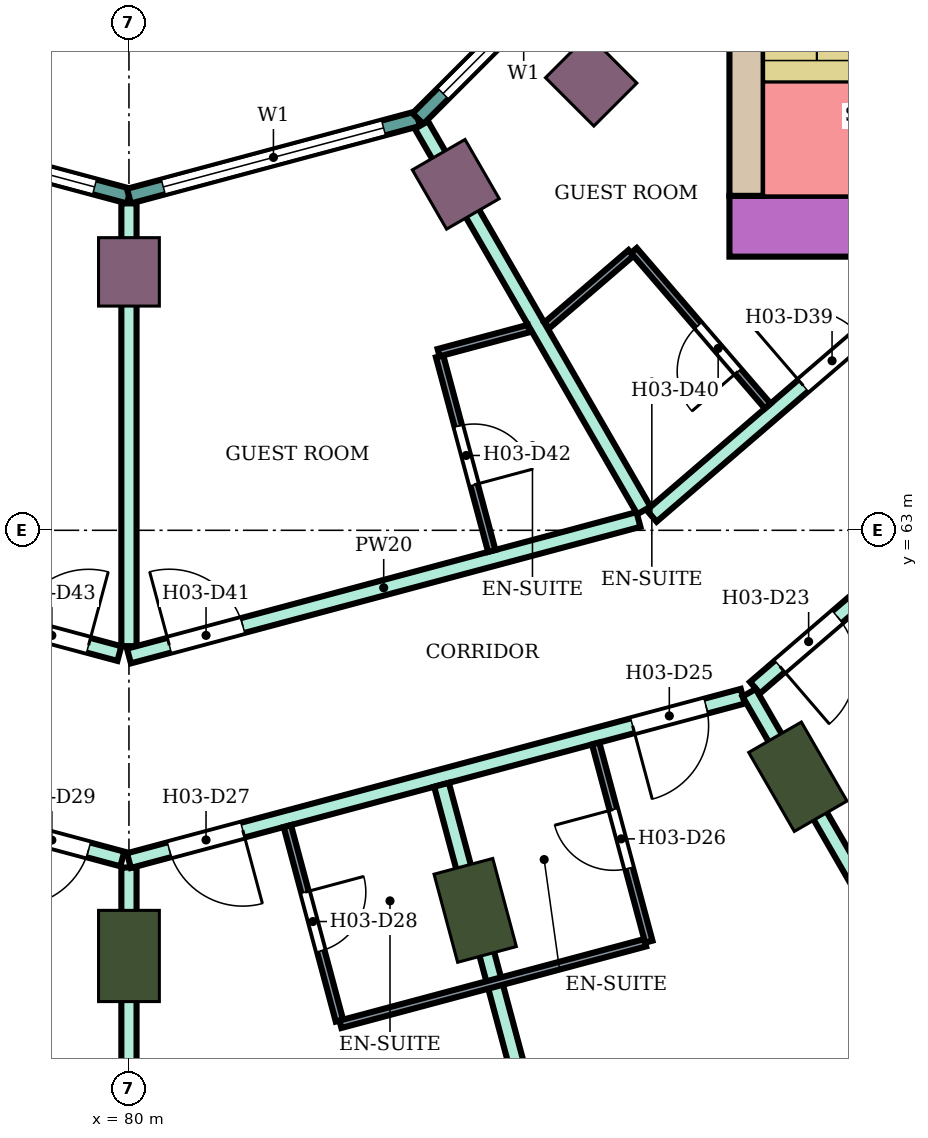
"""IFC4 building model, lengths in metres.
Left out: names, types, materials, properties, quantities, classifications, styles, units other than length and angle.
Written with IfcOpenShell. Run it as: python <this file> out.ifc"""

import sys

from ifc_helpers import new_model, si_unit, direction, frame, frame_2d, origin, origin_2d, place, context, subcontext, project, spatial, rectangle, extrude, element, fill, save


model = new_model("IFC4")
c1 = context("Model", 3, precision=1e-05, world=origin(), true_north=direction((0.0, 1.0)))
c2 = subcontext(c1, "Body", "Model", "MODEL_VIEW")
j1 = project(units=[si_unit("LENGTHUNIT", "METRE"), si_unit("PLANEANGLEUNIT", "RADIAN")], contexts=[c1])
p1 = place(None, origin())
s1 = spatial("IfcSite", under=j1, at=p1, CompositionType="ELEMENT")
p2 = place(p1, origin())
s2 = spatial("IfcBuilding", under=s1, at=p2, CompositionType="ELEMENT")
p3 = place(p2, frame((0.0, 0.0, 59.2)))
s3 = spatial("IfcBuildingStorey", under=s2, at=p3, CompositionType="ELEMENT", Elevation=59.2)
for number, where, z_axis, x_axis in (
    (1, (80.0, 57.4, 0.0), (0.0, 0.0, 1.0), (0.0, -1.0, 0.0)),
    (2, (84.555, 58.0, 0.0), (0.0, 0.0, 1.0), (0.259, -0.966, 0.0)),
    (3, (88.8, 59.758, 0.0), (0.0, 0.0, 1.0), (0.5, -0.866, 0.0)),
):
    element("IfcColumn", number, at=place(p3, frame(where, z_axis=z_axis, x_axis=x_axis)), inside=s3, PredefinedType="COLUMN", context=c2, shape_type="SweptSolid", body=[
        extrude(rectangle(XDim=1.2, YDim=0.8, at=origin_2d()), origin(), (0.0, 0.0, 1.0), 3.8),
    ])
for number, where, z_axis, x_axis in (
    (4, (80.0, 66.4, 0.0), (0.0, 0.0, 1.0), (0.0, -1.0, 0.0)),
    (5, (84.3, 67.552, 0.0), (0.0, 0.0, 1.0), (0.5, -0.866, 0.0)),
    (6, (86.081, 68.919, 0.0), (0.0, 0.0, 1.0), (0.707, -0.707, 0.0)),
):
    element("IfcColumn", number, at=place(p3, frame(where, z_axis=z_axis, x_axis=x_axis)), inside=s3, PredefinedType="COLUMN", context=c2, shape_type="SweptSolid", body=[
        extrude(rectangle(XDim=0.9, YDim=0.8, at=origin_2d()), origin(), (0.0, 0.0, 1.0), 3.8),
    ])
p4 = place(p3, frame((87.9, 67.0, 0.0), z_axis=(0.0, 0.0, 1.0), x_axis=(1.0, 0.0, 0.0)))
e7 = element("IfcWall", 7, at=p4, inside=s3, PredefinedType="SHEAR", context=c2, shape_type="SweptSolid", body=[
    extrude(rectangle(XDim=14.7, YDim=0.8, at=frame_2d((7.35, 0.0))), origin(), (0.0, 0.0, 1.0), 3.48),
])
p5 = place(p4, frame((4.2, 0.0, 0.0)))
e8 = element("IfcOpeningElement", 8, at=p5, cuts=e7, PredefinedType="OPENING", context=c2, shape_type="SweptSolid", body=[
    extrude(rectangle(XDim=2.4, YDim=2.4, at=frame_2d((1.2, 1.2))), frame((0.0, 0.41, 0.0), z_axis=(0.0, -1.0, 0.0), x_axis=(1.0, 0.0, 0.0)), (0.0, 0.0, 1.0), 0.82),
])
p6 = place(p3, frame((88.125, 67.4, 0.0), z_axis=(0.0, 0.0, 1.0), x_axis=(0.0, 1.0, 0.0)))
e9 = element("IfcWall", 9, at=p6, inside=s3, PredefinedType="SHEAR", context=c2, shape_type="SweptSolid", body=[
    extrude(rectangle(XDim=7.6, YDim=0.45, at=frame_2d((3.8, 0.0))), origin(), (0.0, 0.0, 1.0), 3.48),
])
p7 = place(p3, frame((76.198, 68.415, 0.0), z_axis=(0.0, 0.0, 1.0), x_axis=(0.965933654434, -0.258789828301, 0.0)))
e10 = element("IfcWall", 10, at=p7, inside=s3, PredefinedType="NOTDEFINED", context=c2, shape_type="SweptSolid", body=[
    extrude(rectangle(XDim=3.936, YDim=0.2, at=frame_2d((1.968, 0.0))), origin(), (0.0, 0.0, 1.0), 3.8),
])
p8 = place(p7, frame((0.468, 0.0, 0.9)))
e11 = element("IfcOpeningElement", 11, at=p8, cuts=e10, PredefinedType="OPENING", context=c2, shape_type="SweptSolid", body=[
    extrude(rectangle(XDim=3.0, YDim=2.3, at=frame_2d((1.5, 1.15))), frame((0.0, 0.11, 0.0), z_axis=(0.0, -1.0, 0.0), x_axis=(1.0, 0.0, 0.0)), (0.0, 0.0, 1.0), 0.22),
])
p9 = place(p3, frame((80.0, 67.396, 0.0), z_axis=(0.0, 0.0, 1.0), x_axis=(0.965933654434, 0.258789828301, 0.0)))
e12 = element("IfcWall", 12, at=p9, inside=s3, PredefinedType="NOTDEFINED", context=c2, shape_type="SweptSolid", body=[
    extrude(rectangle(XDim=3.936, YDim=0.2, at=frame_2d((1.968, 0.0))), origin(), (0.0, 0.0, 1.0), 3.8),
])
p10 = place(p9, frame((0.468, 0.0, 0.9)))
e13 = element("IfcOpeningElement", 13, at=p10, cuts=e12, PredefinedType="OPENING", context=c2, shape_type="SweptSolid", body=[
    extrude(rectangle(XDim=3.0, YDim=2.3, at=frame_2d((1.5, 1.15))), frame((0.0, 0.11, 0.0), z_axis=(0.0, -1.0, 0.0), x_axis=(1.0, 0.0, 0.0)), (0.0, 0.0, 1.0), 0.22),
])
p11 = place(p3, frame((83.802, 68.415, 0.0), z_axis=(0.0, 0.0, 1.0), x_axis=(0.707106781187, 0.707106781187, 0.0)))
e14 = element("IfcWall", 14, at=p11, inside=s3, PredefinedType="NOTDEFINED", context=c2, shape_type="SweptSolid", body=[
    extrude(rectangle(XDim=3.936, YDim=0.2, at=frame_2d((1.968, 0.0))), origin(), (0.0, 0.0, 1.0), 3.8),
])
p12 = place(p11, frame((0.468, 0.0, 0.9)))
e15 = element("IfcOpeningElement", 15, at=p12, cuts=e14, PredefinedType="OPENING", context=c2, shape_type="SweptSolid", body=[
    extrude(rectangle(XDim=3.0, YDim=2.3, at=frame_2d((1.5, 1.15))), frame((0.0, 0.11, 0.0), z_axis=(0.0, -1.0, 0.0), x_axis=(1.0, 0.0, 0.0)), (0.0, 0.0, 1.0), 0.22),
])
p13 = place(p3, frame((71.877, 60.831, 0.0), z_axis=(0.0, 0.0, 1.0), x_axis=(0.965852509869, -0.259092510851, 0.0)))
e16 = element("IfcWall", 16, at=p13, inside=s3, PredefinedType="PARTITIONING", context=c2, shape_type="SweptSolid", body=[
    extrude(rectangle(XDim=8.32, YDim=0.2, at=frame_2d((4.16, 0.0))), origin(), (0.0, 0.0, 1.0), 3.35),
])
p14 = place(p13, frame((6.86, 0.0, 0.0)))
e17 = element("IfcOpeningElement", 17, at=p14, cuts=e16, PredefinedType="OPENING", context=c2, shape_type="SweptSolid", body=[
    extrude(rectangle(XDim=1.0, YDim=2.1, at=frame_2d((0.5, 1.05))), frame((0.0, 0.11, 0.0), z_axis=(0.0, -1.0, 0.0), x_axis=(1.0, 0.0, 0.0)), (0.0, 0.0, 1.0), 0.22),
])
p15 = place(p13, frame((1.6, 0.0, 0.0)))
e18 = element("IfcOpeningElement", 18, at=p15, cuts=e16, PredefinedType="OPENING", context=c2, shape_type="SweptSolid", body=[
    extrude(rectangle(XDim=1.0, YDim=2.1, at=frame_2d((0.5, 1.05))), frame((0.0, 0.11, 0.0), z_axis=(0.0, -1.0, 0.0), x_axis=(1.0, 0.0, 0.0)), (0.0, 0.0, 1.0), 0.22),
])
p16 = place(p3, frame((73.297, 63.143, 0.0), z_axis=(0.0, 0.0, 1.0), x_axis=(0.965859030528, -0.25906820173, 0.0)))
e19 = element("IfcWall", 19, at=p16, inside=s3, PredefinedType="PARTITIONING", context=c2, shape_type="SweptSolid", body=[
    extrude(rectangle(XDim=6.81, YDim=0.2, at=frame_2d((3.405, 0.0))), origin(), (0.0, 0.0, 1.0), 3.35),
])
p17 = place(p16, frame((5.39, 0.0, 0.0)))
e20 = element("IfcOpeningElement", 20, at=p17, cuts=e19, PredefinedType="OPENING", context=c2, shape_type="SweptSolid", body=[
    extrude(rectangle(XDim=1.0, YDim=2.1, at=frame_2d((0.5, 1.05))), frame((0.0, 0.11, 0.0), z_axis=(0.0, -1.0, 0.0), x_axis=(1.0, 0.0, 0.0)), (0.0, 0.0, 1.0), 0.22),
])
p18 = place(p3, frame((80.0, 51.8, 0.0), z_axis=(0.0, 0.0, 1.0), x_axis=(0.0, 1.0, 0.0)))
e21 = element("IfcWall", 21, at=p18, inside=s3, PredefinedType="PARTITIONING", context=c2, shape_type="SweptSolid", body=[
    extrude(rectangle(XDim=6.764, YDim=0.2, at=frame_2d((3.382, 0.0))), origin(), (0.0, 0.0, 1.0), 3.35),
])
p19 = place(p3, frame((80.0, 58.655, 0.0), z_axis=(0.0, 0.0, 1.0), x_axis=(0.965974635626, 0.258636817424, 0.0)))
e22 = element("IfcWall", 22, at=p19, inside=s3, PredefinedType="PARTITIONING", context=c2, shape_type="SweptSolid", body=[
    extrude(rectangle(XDim=8.36, YDim=0.2, at=frame_2d((4.18, 0.0))), origin(), (0.0, 0.0, 1.0), 3.35),
])
p20 = place(p19, frame((6.86, 0.0, 0.0)))
e23 = element("IfcOpeningElement", 23, at=p20, cuts=e22, PredefinedType="OPENING", context=c2, shape_type="SweptSolid", body=[
    extrude(rectangle(XDim=1.0, YDim=2.1, at=frame_2d((0.5, 1.05))), frame((0.0, 0.11, 0.0), z_axis=(0.0, -1.0, 0.0), x_axis=(1.0, 0.0, 0.0)), (0.0, 0.0, 1.0), 0.22),
])
p21 = place(p19, frame((0.55, 0.0, 0.0)))
e24 = element("IfcOpeningElement", 24, at=p21, cuts=e22, PredefinedType="OPENING", context=c2, shape_type="SweptSolid", body=[
    extrude(rectangle(XDim=1.0, YDim=2.1, at=frame_2d((0.5, 1.05))), frame((0.0, 0.11, 0.0), z_axis=(0.0, -1.0, 0.0), x_axis=(1.0, 0.0, 0.0)), (0.0, 0.0, 1.0), 0.22),
])
p22 = place(p3, frame((80.0, 61.476, 0.0), z_axis=(0.0, 0.0, 1.0), x_axis=(0.0, 1.0, 0.0)))
e25 = element("IfcWall", 25, at=p22, inside=s3, PredefinedType="PARTITIONING", context=c2, shape_type="SweptSolid", body=[
    extrude(rectangle(XDim=5.825, YDim=0.2, at=frame_2d((2.913, 0.0))), origin(), (0.0, 0.0, 1.0), 3.35),
])
p23 = place(p3, frame((80.0, 61.346, 0.0), z_axis=(0.0, 0.0, 1.0), x_axis=(0.965924181808, 0.258825182312, 0.0)))
e26 = element("IfcWall", 26, at=p23, inside=s3, PredefinedType="PARTITIONING", context=c2, shape_type="SweptSolid", body=[
    extrude(rectangle(XDim=6.94, YDim=0.2, at=frame_2d((3.47, 0.0))), origin(), (0.0, 0.0, 1.0), 3.35),
])
p24 = place(p23, frame((0.55, 0.0, 0.0)))
e27 = element("IfcOpeningElement", 27, at=p24, cuts=e26, PredefinedType="OPENING", context=c2, shape_type="SweptSolid", body=[
    extrude(rectangle(XDim=1.0, YDim=2.1, at=frame_2d((0.5, 1.05))), frame((0.0, 0.11, 0.0), z_axis=(0.0, -1.0, 0.0), x_axis=(1.0, 0.0, 0.0)), (0.0, 0.0, 1.0), 0.22),
])
p25 = place(p3, frame((83.848, 68.332, 0.0), z_axis=(0.0, 0.0, 1.0), x_axis=(0.499901724708, -0.866082135617, 0.0)))
e28 = element("IfcWall", 28, at=p25, inside=s3, PredefinedType="PARTITIONING", context=c2, shape_type="SweptSolid", body=[
    extrude(rectangle(XDim=5.855, YDim=0.2, at=frame_2d((2.928, 0.0))), origin(), (0.0, 0.0, 1.0), 3.35),
])
p26 = place(p3, frame((84.112, 59.652, 0.0), z_axis=(0.0, 0.0, 1.0), x_axis=(0.258843225553, -0.965919346832, 0.0)))
e29 = element("IfcWall", 29, at=p26, inside=s3, PredefinedType="PARTITIONING", context=c2, shape_type="SweptSolid", body=[
    extrude(rectangle(XDim=9.909, YDim=0.2, at=frame_2d((4.955, 0.0))), origin(), (0.0, 0.0, 1.0), 3.35),
])
p27 = place(p3, frame((86.877, 63.189, 0.0), z_axis=(0.0, 0.0, 1.0), x_axis=(0.758164888471, 0.652062881853, 0.0)))
e30 = element("IfcWall", 30, at=p27, inside=s3, PredefinedType="PARTITIONING", context=c2, shape_type="SweptSolid", body=[
    extrude(rectangle(XDim=5.23, YDim=0.2, at=frame_2d((2.615, 0.0))), origin(), (0.0, 0.0, 1.0), 3.35),
])
p28 = place(p27, frame((2.63, 0.0, 0.0)))
e31 = element("IfcOpeningElement", 31, at=p28, cuts=e30, PredefinedType="OPENING", context=c2, shape_type="SweptSolid", body=[
    extrude(rectangle(XDim=1.0, YDim=2.1, at=frame_2d((0.5, 1.05))), frame((0.0, 0.11, 0.0), z_axis=(0.0, -1.0, 0.0), x_axis=(1.0, 0.0, 0.0)), (0.0, 0.0, 1.0), 0.22),
])
p29 = place(p3, frame((88.236, 60.929, 0.0), z_axis=(0.0, 0.0, 1.0), x_axis=(0.758227485202, 0.651990092474, 0.0)))
e32 = element("IfcWall", 32, at=p29, inside=s3, PredefinedType="PARTITIONING", context=c2, shape_type="SweptSolid", body=[
    extrude(rectangle(XDim=6.336, YDim=0.2, at=frame_2d((3.168, 0.0))), origin(), (0.0, 0.0, 1.0), 3.35),
])
p30 = place(p29, frame((4.757, 0.0, 0.0)))
e33 = element("IfcOpeningElement", 33, at=p30, cuts=e32, PredefinedType="OPENING", context=c2, shape_type="SweptSolid", body=[
    extrude(rectangle(XDim=1.0, YDim=2.1, at=frame_2d((0.5, 1.05))), frame((0.0, 0.11, 0.0), z_axis=(0.0, -1.0, 0.0), x_axis=(1.0, 0.0, 0.0)), (0.0, 0.0, 1.0), 0.22),
])
p31 = place(p29, frame((0.43, 0.0, 0.0)))
e34 = element("IfcOpeningElement", 34, at=p31, cuts=e32, PredefinedType="OPENING", context=c2, shape_type="SweptSolid", body=[
    extrude(rectangle(XDim=1.0, YDim=2.1, at=frame_2d((0.5, 1.05))), frame((0.0, 0.11, 0.0), z_axis=(0.0, -1.0, 0.0), x_axis=(1.0, 0.0, 0.0)), (0.0, 0.0, 1.0), 0.22),
])
p32 = place(p3, frame((88.159, 60.863, 0.0), z_axis=(0.0, 0.0, 1.0), x_axis=(0.499886028459, -0.866091195286, 0.0)))
e35 = element("IfcWall", 35, at=p32, inside=s3, PredefinedType="PARTITIONING", context=c2, shape_type="SweptSolid", body=[
    extrude(rectangle(XDim=9.475, YDim=0.2, at=frame_2d((4.737, 0.0))), origin(), (0.0, 0.0, 1.0), 3.35),
])
p33 = place(p3, frame((82.084, 59.108, 0.0), z_axis=(0.0, 0.0, 1.0), x_axis=(0.258591746437, -0.965986702121, 0.0)))
e36 = element("IfcWall", 36, at=p33, inside=s3, PredefinedType="PARTITIONING", context=c2, shape_type="SweptSolid", body=[
    extrude(rectangle(XDim=2.649, YDim=0.1, at=frame_2d((1.325, 0.0))), origin(), (0.0, 0.0, 1.0), 3.35),
])
p34 = place(p33, frame((0.9, 0.0, 0.0)))
e37 = element("IfcOpeningElement", 37, at=p34, cuts=e36, PredefinedType="OPENING", context=c2, shape_type="SweptSolid", body=[
    extrude(rectangle(XDim=0.8, YDim=2.1, at=frame_2d((0.4, 1.05))), frame((0.0, 0.06, 0.0), z_axis=(0.0, -1.0, 0.0), x_axis=(1.0, 0.0, 0.0)), (0.0, 0.0, 1.0), 0.12),
])
p35 = place(p3, frame((82.782, 56.501, 0.0), z_axis=(0.0, 0.0, 1.0), x_axis=(0.965999228418, 0.258544949083, 0.0)))
e38 = element("IfcWall", 38, at=p35, inside=s3, PredefinedType="PARTITIONING", context=c2, shape_type="SweptSolid", body=[
    extrude(rectangle(XDim=4.15, YDim=0.1, at=frame_2d((2.075, 0.0))), origin(), (0.0, 0.0, 1.0), 3.35),
])
p36 = place(p3, frame((84.087, 65.289, 0.0), z_axis=(0.0, 0.0, 1.0), x_axis=(0.258929459649, -0.965896234037, 0.0)))
e39 = element("IfcWall", 39, at=p36, inside=s3, PredefinedType="PARTITIONING", context=c2, shape_type="SweptSolid", body=[
    extrude(rectangle(XDim=2.65, YDim=0.1, at=frame_2d((1.325, 0.0))), origin(), (0.0, 0.0, 1.0), 3.35),
])
p37 = place(p36, frame((0.95, 0.0, 0.0)))
e40 = element("IfcOpeningElement", 40, at=p37, cuts=e39, PredefinedType="OPENING", context=c2, shape_type="SweptSolid", body=[
    extrude(rectangle(XDim=0.8, YDim=2.1, at=frame_2d((0.4, 1.05))), frame((0.0, 0.06, 0.0), z_axis=(0.0, -1.0, 0.0), x_axis=(1.0, 0.0, 0.0)), (0.0, 0.0, 1.0), 0.12),
])
p38 = place(p3, frame((84.074, 65.337, 0.0), z_axis=(0.0, 0.0, 1.0), x_axis=(0.965914351064, 0.258861867428, 0.0)))
e41 = element("IfcWall", 41, at=p38, inside=s3, PredefinedType="PARTITIONING", context=c2, shape_type="SweptSolid", body=[
    extrude(rectangle(XDim=1.229, YDim=0.1, at=frame_2d((0.615, 0.0))), origin(), (0.0, 0.0, 1.0), 3.35),
])
p39 = place(p3, frame((85.497, 65.696, 0.0), z_axis=(0.0, 0.0, 1.0), x_axis=(0.75817032582, 0.652056559698, 0.0)))
e42 = element("IfcWall", 42, at=p39, inside=s3, PredefinedType="PARTITIONING", context=c2, shape_type="SweptSolid", body=[
    extrude(rectangle(XDim=1.461, YDim=0.1, at=frame_2d((0.73, 0.0))), origin(), (0.0, 0.0, 1.0), 3.35),
])
p40 = place(p3, frame((86.14, 60.196, 0.0), z_axis=(0.0, 0.0, 1.0), x_axis=(0.258945475746, -0.965891940432, 0.0)))
e43 = element("IfcWall", 43, at=p40, inside=s3, PredefinedType="PARTITIONING", context=c2, shape_type="SweptSolid", body=[
    extrude(rectangle(XDim=2.7, YDim=0.1, at=frame_2d((1.35, 0.0))), origin(), (0.0, 0.0, 1.0), 3.35),
])
p41 = place(p40, frame((0.9, 0.0, 0.0)))
e44 = element("IfcOpeningElement", 44, at=p41, cuts=e43, PredefinedType="OPENING", context=c2, shape_type="SweptSolid", body=[
    extrude(rectangle(XDim=0.8, YDim=2.1, at=frame_2d((0.4, 1.05))), frame((0.0, 0.06, 0.0), z_axis=(0.0, -1.0, 0.0), x_axis=(1.0, 0.0, 0.0)), (0.0, 0.0, 1.0), 0.12),
])
p42 = place(p3, frame((86.643, 66.681, 0.0), z_axis=(0.0, 0.0, 1.0), x_axis=(0.652264876065, -0.757991115682, 0.0)))
e45 = element("IfcWall", 45, at=p42, inside=s3, PredefinedType="PARTITIONING", context=c2, shape_type="SweptSolid", body=[
    extrude(rectangle(XDim=2.699, YDim=0.1, at=frame_2d((1.35, 0.0))), origin(), (0.0, 0.0, 1.0), 3.35),
])
p43 = place(p42, frame((1.3, 0.0, 0.0)))
e46 = element("IfcOpeningElement", 46, at=p43, cuts=e45, PredefinedType="OPENING", context=c2, shape_type="SweptSolid", body=[
    extrude(rectangle(XDim=0.8, YDim=2.1, at=frame_2d((0.4, 1.05))), frame((0.0, 0.06, 0.0), z_axis=(0.0, -1.0, 0.0), x_axis=(1.0, 0.0, 0.0)), (0.0, 0.0, 1.0), 0.12),
])
p44 = place(p8, origin())
e47 = element("IfcWindow", 47, at=p44, inside=s3, PartitioningType="SINGLE_PANEL", PredefinedType="WINDOW", context=c2, shape_type="SweptSolid", body=[
    extrude(rectangle(XDim=3.0, YDim=2.3, at=frame_2d((1.5, 1.15))), frame((0.0, 0.03, 0.0), z_axis=(0.0, -1.0, 0.0), x_axis=(1.0, 0.0, 0.0)), (0.0, 0.0, 1.0), 0.06),
])
fill(e11, e47)
p45 = place(p10, origin())
e48 = element("IfcWindow", 48, at=p45, inside=s3, PartitioningType="SINGLE_PANEL", PredefinedType="WINDOW", context=c2, shape_type="SweptSolid", body=[
    extrude(rectangle(XDim=3.0, YDim=2.3, at=frame_2d((1.5, 1.15))), frame((0.0, 0.03, 0.0), z_axis=(0.0, -1.0, 0.0), x_axis=(1.0, 0.0, 0.0)), (0.0, 0.0, 1.0), 0.06),
])
fill(e13, e48)
p46 = place(p12, origin())
e49 = element("IfcWindow", 49, at=p46, inside=s3, PartitioningType="SINGLE_PANEL", PredefinedType="WINDOW", context=c2, shape_type="SweptSolid", body=[
    extrude(rectangle(XDim=3.0, YDim=2.3, at=frame_2d((1.5, 1.15))), frame((0.0, 0.03, 0.0), z_axis=(0.0, -1.0, 0.0), x_axis=(1.0, 0.0, 0.0)), (0.0, 0.0, 1.0), 0.06),
])
fill(e15, e49)
p47 = place(p31, frame((1.0, 0.0, 0.0), z_axis=(0.0, 0.0, 1.0), x_axis=(-1.0, 0.0, 0.0)))
e50 = element("IfcDoor", 50, at=p47, inside=s3, OperationType="SINGLE_SWING_RIGHT", PredefinedType="DOOR", context=c2, shape_type="SweptSolid", body=[
    extrude(rectangle(XDim=1.0, YDim=2.1, at=frame_2d((0.5, 1.05))), frame((0.0, 0.025, 0.0), z_axis=(0.0, -1.0, 0.0), x_axis=(1.0, 0.0, 0.0)), (0.0, 0.0, 1.0), 0.05),
])
fill(e34, e50)
p48 = place(p20, frame((1.0, 0.0, 0.0), z_axis=(0.0, 0.0, 1.0), x_axis=(-1.0, 0.0, 0.0)))
e51 = element("IfcDoor", 51, at=p48, inside=s3, OperationType="SINGLE_SWING_RIGHT", PredefinedType="DOOR", context=c2, shape_type="SweptSolid", body=[
    extrude(rectangle(XDim=1.0, YDim=2.1, at=frame_2d((0.5, 1.05))), frame((0.0, 0.025, 0.0), z_axis=(0.0, -1.0, 0.0), x_axis=(1.0, 0.0, 0.0)), (0.0, 0.0, 1.0), 0.05),
])
fill(e23, e51)
p49 = place(p41, frame((0.8, 0.0, 0.0), z_axis=(0.0, 0.0, 1.0), x_axis=(-1.0, 0.0, 0.0)))
e52 = element("IfcDoor", 52, at=p49, inside=s3, OperationType="SINGLE_SWING_RIGHT", PredefinedType="DOOR", context=c2, shape_type="SweptSolid", body=[
    extrude(rectangle(XDim=0.8, YDim=2.1, at=frame_2d((0.4, 1.05))), frame((0.0, 0.025, 0.0), z_axis=(0.0, -1.0, 0.0), x_axis=(1.0, 0.0, 0.0)), (0.0, 0.0, 1.0), 0.05),
])
fill(e44, e52)
p50 = place(p21, frame((1.0, 0.0, 0.0), z_axis=(0.0, 0.0, 1.0), x_axis=(-1.0, 0.0, 0.0)))
e53 = element("IfcDoor", 53, at=p50, inside=s3, OperationType="SINGLE_SWING_LEFT", PredefinedType="DOOR", context=c2, shape_type="SweptSolid", body=[
    extrude(rectangle(XDim=1.0, YDim=2.1, at=frame_2d((0.5, 1.05))), frame((0.0, 0.025, 0.0), z_axis=(0.0, -1.0, 0.0), x_axis=(1.0, 0.0, 0.0)), (0.0, 0.0, 1.0), 0.05),
])
fill(e24, e53)
p51 = place(p34, origin())
e54 = element("IfcDoor", 54, at=p51, inside=s3, OperationType="SINGLE_SWING_LEFT", PredefinedType="DOOR", context=c2, shape_type="SweptSolid", body=[
    extrude(rectangle(XDim=0.8, YDim=2.1, at=frame_2d((0.4, 1.05))), frame((0.0, 0.025, 0.0), z_axis=(0.0, -1.0, 0.0), x_axis=(1.0, 0.0, 0.0)), (0.0, 0.0, 1.0), 0.05),
])
fill(e37, e54)
p52 = place(p14, frame((1.0, 0.0, 0.0), z_axis=(0.0, 0.0, 1.0), x_axis=(-1.0, 0.0, 0.0)))
e55 = element("IfcDoor", 55, at=p52, inside=s3, OperationType="SINGLE_SWING_RIGHT", PredefinedType="DOOR", context=c2, shape_type="SweptSolid", body=[
    extrude(rectangle(XDim=1.0, YDim=2.1, at=frame_2d((0.5, 1.05))), frame((0.0, 0.025, 0.0), z_axis=(0.0, -1.0, 0.0), x_axis=(1.0, 0.0, 0.0)), (0.0, 0.0, 1.0), 0.05),
])
fill(e17, e55)
p53 = place(p28, origin())
e56 = element("IfcDoor", 56, at=p53, inside=s3, OperationType="SINGLE_SWING_LEFT", PredefinedType="DOOR", context=c2, shape_type="SweptSolid", body=[
    extrude(rectangle(XDim=1.0, YDim=2.1, at=frame_2d((0.5, 1.05))), frame((0.0, 0.025, 0.0), z_axis=(0.0, -1.0, 0.0), x_axis=(1.0, 0.0, 0.0)), (0.0, 0.0, 1.0), 0.05),
])
fill(e31, e56)
p54 = place(p43, frame((0.8, 0.0, 0.0), z_axis=(0.0, 0.0, 1.0), x_axis=(-1.0, 0.0, 0.0)))
e57 = element("IfcDoor", 57, at=p54, inside=s3, OperationType="SINGLE_SWING_LEFT", PredefinedType="DOOR", context=c2, shape_type="SweptSolid", body=[
    extrude(rectangle(XDim=0.8, YDim=2.1, at=frame_2d((0.4, 1.05))), frame((0.0, 0.025, 0.0), z_axis=(0.0, -1.0, 0.0), x_axis=(1.0, 0.0, 0.0)), (0.0, 0.0, 1.0), 0.05),
])
fill(e46, e57)
p55 = place(p24, origin())
e58 = element("IfcDoor", 58, at=p55, inside=s3, OperationType="SINGLE_SWING_LEFT", PredefinedType="DOOR", context=c2, shape_type="SweptSolid", body=[
    extrude(rectangle(XDim=1.0, YDim=2.1, at=frame_2d((0.5, 1.05))), frame((0.0, 0.025, 0.0), z_axis=(0.0, -1.0, 0.0), x_axis=(1.0, 0.0, 0.0)), (0.0, 0.0, 1.0), 0.05),
])
fill(e27, e58)
p56 = place(p37, origin())
e59 = element("IfcDoor", 59, at=p56, inside=s3, OperationType="SINGLE_SWING_RIGHT", PredefinedType="DOOR", context=c2, shape_type="SweptSolid", body=[
    extrude(rectangle(XDim=0.8, YDim=2.1, at=frame_2d((0.4, 1.05))), frame((0.0, 0.025, 0.0), z_axis=(0.0, -1.0, 0.0), x_axis=(1.0, 0.0, 0.0)), (0.0, 0.0, 1.0), 0.05),
])
fill(e40, e59)
p57 = place(p17, origin())
e60 = element("IfcDoor", 60, at=p57, inside=s3, OperationType="SINGLE_SWING_RIGHT", PredefinedType="DOOR", context=c2, shape_type="SweptSolid", body=[
    extrude(rectangle(XDim=1.0, YDim=2.1, at=frame_2d((0.5, 1.05))), frame((0.0, 0.025, 0.0), z_axis=(0.0, -1.0, 0.0), x_axis=(1.0, 0.0, 0.0)), (0.0, 0.0, 1.0), 0.05),
])
fill(e20, e60)
save(model, sys.argv[1])
